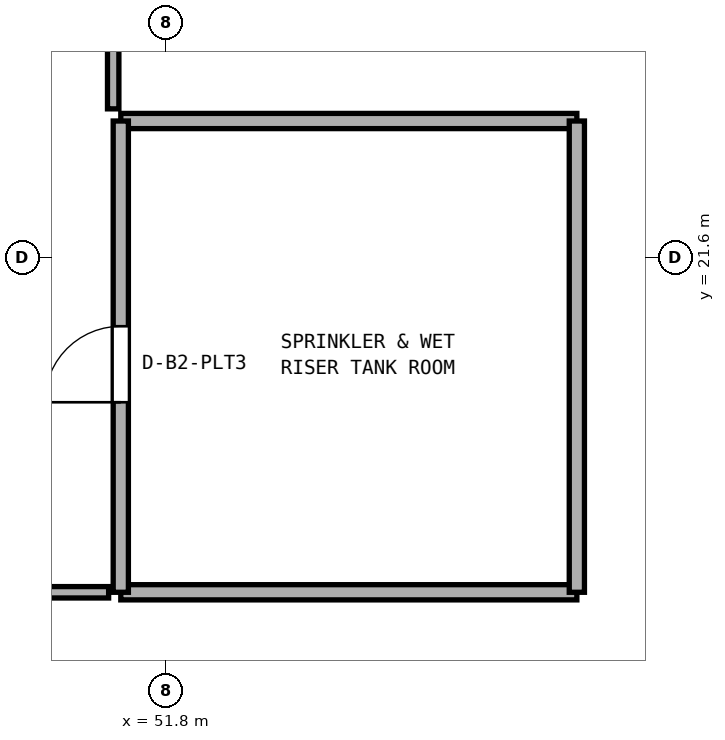
"""IFC4 building model, lengths in metres.
Left out: names, types, materials, properties, quantities, classifications, styles, units other than length and angle.
Written with IfcOpenShell. Run it as: python <this file> out.ifc"""

import sys

from ifc_helpers import new_model, si_unit, direction, frame, frame_2d, origin, place, context, subcontext, project, spatial, rectangle, extrude, element, fill, save


model = new_model("IFC4")
c1 = context("Model", 3, precision=1e-05, world=origin(), true_north=direction((0.0, 1.0)))
c2 = subcontext(c1, "Body", "Model", "MODEL_VIEW")
j1 = project(units=[si_unit("LENGTHUNIT", "METRE"), si_unit("PLANEANGLEUNIT", "RADIAN")], contexts=[c1])
p1 = place(None, origin())
s1 = spatial("IfcSite", under=j1, at=p1, CompositionType="ELEMENT")
p2 = place(p1, origin())
s2 = spatial("IfcBuilding", under=s1, at=p2, CompositionType="ELEMENT")
p3 = place(p2, frame((0.0, 0.0, -9.6)))
s3 = spatial("IfcBuildingStorey", under=s2, at=p3, CompositionType="ELEMENT", Elevation=-9.6)
for number, where, z_axis, x_axis in (
    (1, (51.2, 17.2, 0.0), (0.0, 0.0, 1.0), (1.0, 0.0, 0.0)),
    (2, (51.2, 23.4, 0.0), (0.0, 0.0, 1.0), (1.0, 0.0, 0.0)),
):
    element("IfcWall", number, at=place(p3, frame(where, z_axis=z_axis, x_axis=x_axis)), inside=s3, PredefinedType="SOLIDWALL", context=c2, shape_type="SweptSolid", body=[
        extrude(rectangle(XDim=6.0, YDim=0.2, at=frame_2d((3.0, 0.0))), origin(), (0.0, 0.0, 1.0), 4.45),
    ])
p4 = place(p3, frame((51.2, 17.2, 0.0), z_axis=(0.0, 0.0, 1.0), x_axis=(0.0, 1.0, 0.0)))
e3 = element("IfcWall", 3, at=p4, inside=s3, PredefinedType="SOLIDWALL", context=c2, shape_type="SweptSolid", body=[
    extrude(rectangle(XDim=6.2, YDim=0.2, at=frame_2d((3.1, 0.0))), origin(), (0.0, 0.0, 1.0), 4.45),
])
p5 = place(p4, frame((2.5, 0.0, 0.0)))
e4 = element("IfcOpeningElement", 4, at=p5, cuts=e3, PredefinedType="OPENING", context=c2, shape_type="SweptSolid", body=[
    extrude(rectangle(XDim=1.0, YDim=2.12, at=frame_2d((0.5, 1.06))), frame((0.0, 0.11, 0.0), z_axis=(0.0, -1.0, 0.0), x_axis=(1.0, 0.0, 0.0)), (0.0, 0.0, 1.0), 0.22),
])
p6 = place(p3, frame((57.2, 17.2, 0.0), z_axis=(0.0, 0.0, 1.0), x_axis=(0.0, 1.0, 0.0)))
e5 = element("IfcWall", 5, at=p6, inside=s3, PredefinedType="SOLIDWALL", context=c2, shape_type="SweptSolid", body=[
    extrude(rectangle(XDim=6.2, YDim=0.2, at=frame_2d((3.1, 0.0))), origin(), (0.0, 0.0, 1.0), 4.45),
])
p7 = place(p3, frame((51.1, 23.56, 0.0), z_axis=(0.0, 0.0, 1.0), x_axis=(0.0, 1.0, 0.0)))
e6 = element("IfcWall", 6, at=p7, inside=s3, PredefinedType="PARTITIONING", context=c2, shape_type="SweptSolid", body=[
    extrude(rectangle(XDim=3.28, YDim=0.15, at=frame_2d((1.64, 0.0))), origin(), (0.0, 0.0, 1.0), 4.45),
])
p8 = place(p3, frame((48.74, 17.2, 0.0), z_axis=(0.0, 0.0, 1.0), x_axis=(1.0, 0.0, 0.0)))
e7 = element("IfcWall", 7, at=p8, inside=s3, PredefinedType="PARTITIONING", context=c2, shape_type="SweptSolid", body=[
    extrude(rectangle(XDim=2.3, YDim=0.15, at=frame_2d((1.15, 0.0))), origin(), (0.0, 0.0, 1.0), 4.45),
])
p9 = place(p5, origin())
e8 = element("IfcDoor", 8, at=p9, inside=s3, OperationType="SINGLE_SWING_LEFT", PredefinedType="DOOR", context=c2, shape_type="SweptSolid", body=[
    extrude(rectangle(XDim=1.0, YDim=2.12, at=frame_2d((0.5, 1.06))), frame((0.0, 0.025, 0.0), z_axis=(0.0, -1.0, 0.0), x_axis=(1.0, 0.0, 0.0)), (0.0, 0.0, 1.0), 0.05),
])
fill(e4, e8)
save(model, sys.argv[1])
